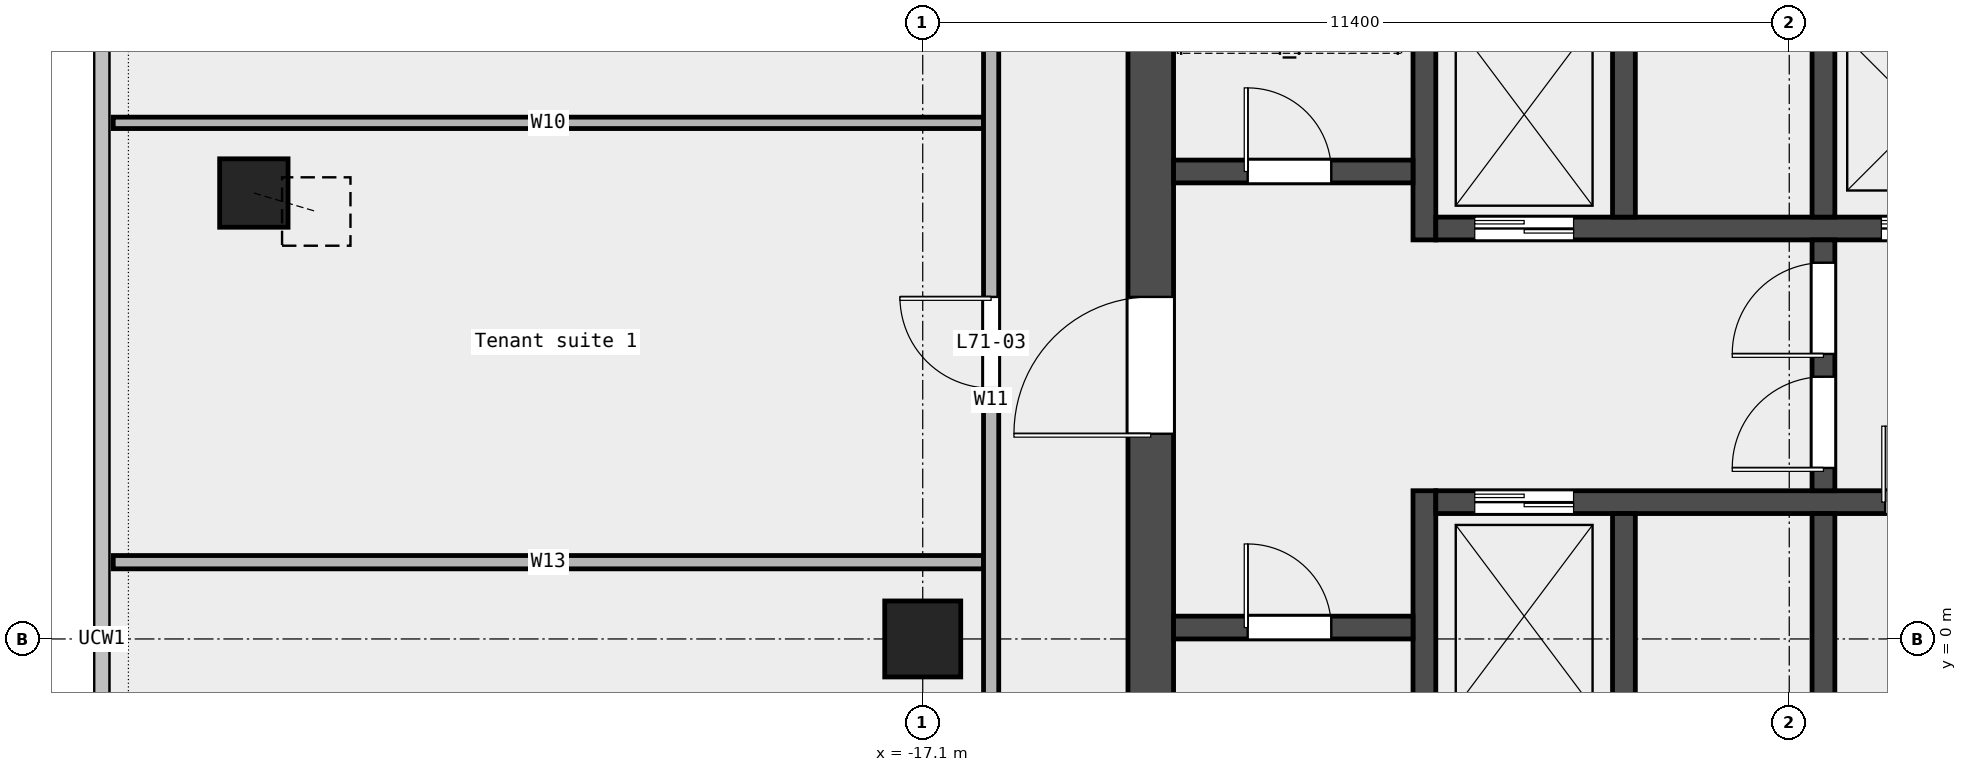
"""IFC4 building model, lengths in metres.
Left out: names, types, materials, properties, quantities, classifications, styles, units other than length and angle.
Written with IfcOpenShell. Run it as: python <this file> out.ifc"""

import sys

from ifc_helpers import new_model, si_unit, direction, frame, frame_2d, origin, origin_2d, place, context, subcontext, project, spatial, rectangle, extrude, element, fill, save


model = new_model("IFC4")
c1 = context("Model", 3, precision=1e-05, world=origin(), true_north=direction((0.0, 1.0)))
c2 = subcontext(c1, "Body", "Model", "MODEL_VIEW")
j1 = project(units=[si_unit("LENGTHUNIT", "METRE"), si_unit("PLANEANGLEUNIT", "RADIAN")], contexts=[c1])
p1 = place(None, origin())
s1 = spatial("IfcSite", under=j1, at=p1, CompositionType="ELEMENT")
p2 = place(p1, origin())
s2 = spatial("IfcBuilding", under=s1, at=p2, CompositionType="ELEMENT")
p3 = place(p2, frame((0.0, 0.0, 325.4)))
s3 = spatial("IfcBuildingStorey", under=s2, at=p3, CompositionType="ELEMENT", Elevation=325.4)
p4 = place(p3, frame((-25.9, 5.867, 0.0), z_axis=(0.218989598564, -0.064856865944, 0.973569279847), x_axis=(0.283971837833, 0.958832621117, 0.0)))
e1 = element("IfcColumn", 1, at=p4, inside=s3, PredefinedType="COLUMN", context=c2, shape_type="SweptSolid", body=[
    extrude(rectangle(XDim=0.9, YDim=0.9, at=origin_2d()), origin(), (0.0, 0.0, 1.0), 3.749),
])
p5 = place(p3, frame((-17.1, 0.0, 0.0), z_axis=(0.0, 0.0, 1.0), x_axis=(1.0, 0.0, 0.0)))
e2 = element("IfcColumn", 2, at=p5, inside=s3, PredefinedType="COLUMN", context=c2, shape_type="SweptSolid", body=[
    extrude(rectangle(XDim=1.0, YDim=1.0, at=origin_2d()), origin(), (0.0, 0.0, 1.0), 3.65),
])
p6 = place(p3, frame((-27.75, 1.01, 0.0), z_axis=(0.0, 0.0, 1.0), x_axis=(1.0, 0.0, 0.0)))
e3 = element("IfcWall", 3, at=p6, inside=s3, PredefinedType="PARTITIONING", context=c2, shape_type="SweptSolid", body=[
    extrude(rectangle(XDim=11.45, YDim=0.175, at=frame_2d((5.725, 0.0))), origin(), (0.0, 0.0, 1.0), 3.65),
])
p7 = place(p3, frame((-27.75, 6.79, 0.0), z_axis=(0.0, 0.0, 1.0), x_axis=(1.0, 0.0, 0.0)))
e4 = element("IfcWall", 4, at=p7, inside=s3, PredefinedType="PARTITIONING", context=c2, shape_type="SweptSolid", body=[
    extrude(rectangle(XDim=11.45, YDim=0.15, at=frame_2d((5.725, 0.0))), origin(), (0.0, 0.0, 1.0), 3.65),
])
p8 = place(p3, frame((-16.2, -7.1, 0.0), z_axis=(0.0, 0.0, 1.0), x_axis=(0.0, 1.0, 0.0)))
e5 = element("IfcWall", 5, at=p8, inside=s3, PredefinedType="PARTITIONING", context=c2, shape_type="SweptSolid", body=[
    extrude(rectangle(XDim=20.5, YDim=0.2, at=frame_2d((10.25, 0.0))), origin(), (0.0, 0.0, 1.0), 3.65),
])
p9 = place(p8, frame((10.4, 0.0, 0.0)))
e6 = element("IfcOpeningElement", 6, at=p9, cuts=e5, PredefinedType="OPENING", context=c2, shape_type="SweptSolid", body=[
    extrude(rectangle(XDim=1.2, YDim=2.1, at=frame_2d((0.6, 1.05))), frame((0.0, 0.112, 0.0), z_axis=(0.0, -1.0, 0.0), x_axis=(1.0, 0.0, 0.0)), (0.0, 0.0, 1.0), 0.224),
])
p10 = place(p3, frame((-14.1, -6.6, 0.0), z_axis=(0.0, 0.0, 1.0), x_axis=(0.0, 1.0, 0.0)))
e7 = element("IfcWall", 7, at=p10, inside=s3, PredefinedType="SHEAR", context=c2, shape_type="SweptSolid", body=[
    extrude(rectangle(XDim=19.5, YDim=0.6, at=frame_2d((9.75, 0.0))), origin(), (0.0, 0.0, 1.0), 3.7),
])
p11 = place(p10, frame((9.3, 0.0, 0.0)))
e8 = element("IfcOpeningElement", 8, at=p11, cuts=e7, PredefinedType="OPENING", context=c2, shape_type="SweptSolid", body=[
    extrude(rectangle(XDim=1.8, YDim=2.1, at=frame_2d((0.9, 1.05))), frame((0.0, 0.312, 0.0), z_axis=(0.0, -1.0, 0.0), x_axis=(1.0, 0.0, 0.0)), (0.0, 0.0, 1.0), 0.624),
])
p12 = place(p3, frame((-10.5, -6.6, 0.0), z_axis=(0.0, 0.0, 1.0), x_axis=(0.0, 1.0, 0.0)))
e9 = element("IfcWall", 9, at=p12, inside=s3, PredefinedType="SHEAR", context=c2, shape_type="SweptSolid", body=[
    extrude(rectangle(XDim=8.55, YDim=0.3, at=frame_2d((4.275, 0.0))), origin(), (0.0, 0.0, 1.0), 3.7),
])
p13 = place(p3, frame((-10.5, 5.25, 0.0), z_axis=(0.0, 0.0, 1.0), x_axis=(0.0, 1.0, 0.0)))
e10 = element("IfcWall", 10, at=p13, inside=s3, PredefinedType="SHEAR", context=c2, shape_type="SweptSolid", body=[
    extrude(rectangle(XDim=7.65, YDim=0.3, at=frame_2d((3.825, 0.0))), origin(), (0.0, 0.0, 1.0), 3.7),
])
p14 = place(p3, frame((-13.8, 0.15, 0.0), z_axis=(0.0, 0.0, 1.0), x_axis=(1.0, 0.0, 0.0)))
e11 = element("IfcWall", 11, at=p14, inside=s3, PredefinedType="SOLIDWALL", context=c2, shape_type="SweptSolid", body=[
    extrude(rectangle(XDim=3.15, YDim=0.3, at=frame_2d((1.575, 0.0))), origin(), (0.0, 0.0, 1.0), 3.7),
])
p15 = place(p14, frame((0.975, 0.0, 0.0)))
e12 = element("IfcOpeningElement", 12, at=p15, cuts=e11, PredefinedType="OPENING", context=c2, shape_type="SweptSolid", body=[
    extrude(rectangle(XDim=1.1, YDim=2.1, at=frame_2d((0.55, 1.05))), frame((0.0, 0.162, 0.0), z_axis=(0.0, -1.0, 0.0), x_axis=(1.0, 0.0, 0.0)), (0.0, 0.0, 1.0), 0.324),
])
p16 = place(p3, frame((-13.8, 6.15, 0.0), z_axis=(0.0, 0.0, 1.0), x_axis=(1.0, 0.0, 0.0)))
e13 = element("IfcWall", 13, at=p16, inside=s3, PredefinedType="SOLIDWALL", context=c2, shape_type="SweptSolid", body=[
    extrude(rectangle(XDim=3.15, YDim=0.3, at=frame_2d((1.575, 0.0))), origin(), (0.0, 0.0, 1.0), 3.7),
])
p17 = place(p16, frame((0.975, 0.0, 0.0)))
e14 = element("IfcOpeningElement", 14, at=p17, cuts=e13, PredefinedType="OPENING", context=c2, shape_type="SweptSolid", body=[
    extrude(rectangle(XDim=1.1, YDim=2.1, at=frame_2d((0.55, 1.05))), frame((0.0, 0.162, 0.0), z_axis=(0.0, -1.0, 0.0), x_axis=(1.0, 0.0, 0.0)), (0.0, 0.0, 1.0), 0.324),
])
p18 = place(p3, frame((-10.35, 1.8, 0.0), z_axis=(0.0, 0.0, 1.0), x_axis=(1.0, 0.0, 0.0)))
e15 = element("IfcWall", 15, at=p18, inside=s3, PredefinedType="SOLIDWALL", context=c2, shape_type="SweptSolid", body=[
    extrude(rectangle(XDim=20.7, YDim=0.3, at=frame_2d((10.35, 0.0))), origin(), (0.0, 0.0, 1.0), 3.7),
])
p19 = place(p18, frame((0.512, 0.0, 0.0)))
e16 = element("IfcOpeningElement", 16, at=p19, cuts=e15, PredefinedType="OPENING", context=c2, shape_type="SweptSolid", body=[
    extrude(rectangle(XDim=1.3, YDim=2.1, at=frame_2d((0.65, 1.05))), frame((0.0, 0.162, 0.0), z_axis=(0.0, -1.0, 0.0), x_axis=(1.0, 0.0, 0.0)), (0.0, 0.0, 1.0), 0.324),
])
p20 = place(p18, frame((5.913, 0.0, 0.0)))
e17 = element("IfcOpeningElement", 17, at=p20, cuts=e15, PredefinedType="OPENING", context=c2, shape_type="SweptSolid", body=[
    extrude(rectangle(XDim=1.0, YDim=2.1, at=frame_2d((0.5, 1.05))), frame((0.0, 0.162, 0.0), z_axis=(0.0, -1.0, 0.0), x_axis=(1.0, 0.0, 0.0)), (0.0, 0.0, 1.0), 0.324),
])
p21 = place(p18, frame((13.788, 0.0, 0.0)))
e18 = element("IfcOpeningElement", 18, at=p21, cuts=e15, PredefinedType="OPENING", context=c2, shape_type="SweptSolid", body=[
    extrude(rectangle(XDim=1.0, YDim=2.1, at=frame_2d((0.5, 1.05))), frame((0.0, 0.162, 0.0), z_axis=(0.0, -1.0, 0.0), x_axis=(1.0, 0.0, 0.0)), (0.0, 0.0, 1.0), 0.324),
])
p22 = place(p3, frame((-10.35, 5.4, 0.0), z_axis=(0.0, 0.0, 1.0), x_axis=(1.0, 0.0, 0.0)))
e19 = element("IfcWall", 19, at=p22, inside=s3, PredefinedType="SOLIDWALL", context=c2, shape_type="SweptSolid", body=[
    extrude(rectangle(XDim=20.7, YDim=0.3, at=frame_2d((10.35, 0.0))), origin(), (0.0, 0.0, 1.0), 3.7),
])
p23 = place(p22, frame((0.512, 0.0, 0.0)))
e20 = element("IfcOpeningElement", 20, at=p23, cuts=e19, PredefinedType="OPENING", context=c2, shape_type="SweptSolid", body=[
    extrude(rectangle(XDim=1.3, YDim=2.1, at=frame_2d((0.65, 1.05))), frame((0.0, 0.162, 0.0), z_axis=(0.0, -1.0, 0.0), x_axis=(1.0, 0.0, 0.0)), (0.0, 0.0, 1.0), 0.324),
])
p24 = place(p22, frame((5.863, 0.0, 0.0)))
e21 = element("IfcOpeningElement", 21, at=p24, cuts=e19, PredefinedType="OPENING", context=c2, shape_type="SweptSolid", body=[
    extrude(rectangle(XDim=1.1, YDim=2.1, at=frame_2d((0.55, 1.05))), frame((0.0, 0.162, 0.0), z_axis=(0.0, -1.0, 0.0), x_axis=(1.0, 0.0, 0.0)), (0.0, 0.0, 1.0), 0.324),
])
p25 = place(p22, frame((8.488, 0.0, 0.0)))
e22 = element("IfcOpeningElement", 22, at=p25, cuts=e19, PredefinedType="OPENING", context=c2, shape_type="SweptSolid", body=[
    extrude(rectangle(XDim=1.1, YDim=2.1, at=frame_2d((0.55, 1.05))), frame((0.0, 0.162, 0.0), z_axis=(0.0, -1.0, 0.0), x_axis=(1.0, 0.0, 0.0)), (0.0, 0.0, 1.0), 0.324),
])
p26 = place(p22, frame((11.113, 0.0, 0.0)))
e23 = element("IfcOpeningElement", 23, at=p26, cuts=e19, PredefinedType="OPENING", context=c2, shape_type="SweptSolid", body=[
    extrude(rectangle(XDim=1.1, YDim=2.1, at=frame_2d((0.55, 1.05))), frame((0.0, 0.162, 0.0), z_axis=(0.0, -1.0, 0.0), x_axis=(1.0, 0.0, 0.0)), (0.0, 0.0, 1.0), 0.324),
])
p27 = place(p22, frame((13.738, 0.0, 0.0)))
e24 = element("IfcOpeningElement", 24, at=p27, cuts=e19, PredefinedType="OPENING", context=c2, shape_type="SweptSolid", body=[
    extrude(rectangle(XDim=1.1, YDim=2.1, at=frame_2d((0.55, 1.05))), frame((0.0, 0.162, 0.0), z_axis=(0.0, -1.0, 0.0), x_axis=(1.0, 0.0, 0.0)), (0.0, 0.0, 1.0), 0.324),
])
p28 = place(p22, frame((16.363, 0.0, 0.0)))
e25 = element("IfcOpeningElement", 25, at=p28, cuts=e19, PredefinedType="OPENING", context=c2, shape_type="SweptSolid", body=[
    extrude(rectangle(XDim=1.1, YDim=2.1, at=frame_2d((0.55, 1.05))), frame((0.0, 0.162, 0.0), z_axis=(0.0, -1.0, 0.0), x_axis=(1.0, 0.0, 0.0)), (0.0, 0.0, 1.0), 0.324),
])
p29 = place(p22, frame((18.988, 0.0, 0.0)))
e26 = element("IfcOpeningElement", 26, at=p29, cuts=e19, PredefinedType="OPENING", context=c2, shape_type="SweptSolid", body=[
    extrude(rectangle(XDim=1.1, YDim=2.1, at=frame_2d((0.55, 1.05))), frame((0.0, 0.162, 0.0), z_axis=(0.0, -1.0, 0.0), x_axis=(1.0, 0.0, 0.0)), (0.0, 0.0, 1.0), 0.324),
])
for number, where, z_axis, x_axis in (
    (27, (-7.875, -1.05, 0.0), (0.0, 0.0, 1.0), (0.0, 1.0, 0.0)),
    (28, (-5.25, -1.05, 0.0), (0.0, 0.0, 1.0), (0.0, 1.0, 0.0)),
    (29, (-7.875, 5.55, 0.0), (0.0, 0.0, 1.0), (0.0, 1.0, 0.0)),
    (30, (-5.25, 5.55, 0.0), (0.0, 0.0, 1.0), (0.0, 1.0, 0.0)),
):
    element("IfcWall", number, at=place(p3, frame(where, z_axis=z_axis, x_axis=x_axis)), inside=s3, PredefinedType="SOLIDWALL", context=c2, shape_type="SweptSolid", body=[
        extrude(rectangle(XDim=2.7, YDim=0.3, at=frame_2d((1.35, 0.0))), origin(), (0.0, 0.0, 1.0), 3.7),
    ])
p30 = place(p3, frame((-5.25, 1.95, 0.0), z_axis=(0.0, 0.0, 1.0), x_axis=(0.0, 1.0, 0.0)))
e31 = element("IfcWall", 31, at=p30, inside=s3, PredefinedType="SOLIDWALL", context=c2, shape_type="SweptSolid", body=[
    extrude(rectangle(XDim=3.3, YDim=0.3, at=frame_2d((1.65, 0.0))), origin(), (0.0, 0.0, 1.0), 3.7),
])
p31 = place(p30, frame((0.3, 0.0, 0.0)))
e32 = element("IfcOpeningElement", 32, at=p31, cuts=e31, PredefinedType="OPENING", context=c2, shape_type="SweptSolid", body=[
    extrude(rectangle(XDim=1.2, YDim=2.1, at=frame_2d((0.6, 1.05))), frame((0.0, 0.162, 0.0), z_axis=(0.0, -1.0, 0.0), x_axis=(1.0, 0.0, 0.0)), (0.0, 0.0, 1.0), 0.324),
])
p32 = place(p30, frame((1.8, 0.0, 0.0)))
e33 = element("IfcOpeningElement", 33, at=p32, cuts=e31, PredefinedType="OPENING", context=c2, shape_type="SweptSolid", body=[
    extrude(rectangle(XDim=1.2, YDim=2.1, at=frame_2d((0.6, 1.05))), frame((0.0, 0.162, 0.0), z_axis=(0.0, -1.0, 0.0), x_axis=(1.0, 0.0, 0.0)), (0.0, 0.0, 1.0), 0.324),
])
p33 = place(p9, origin())
e34 = element("IfcDoor", 34, at=p33, inside=s3, OperationType="SINGLE_SWING_RIGHT", PredefinedType="DOOR", context=c2, shape_type="SweptSolid", body=[
    extrude(rectangle(XDim=1.2, YDim=2.1, at=frame_2d((0.6, 1.05))), frame((0.0, 0.025, 0.0), z_axis=(0.0, -1.0, 0.0), x_axis=(1.0, 0.0, 0.0)), (0.0, 0.0, 1.0), 0.05),
])
fill(e6, e34)
p34 = place(p15, origin())
e35 = element("IfcDoor", 35, at=p34, inside=s3, OperationType="SINGLE_SWING_LEFT", PredefinedType="DOOR", context=c2, shape_type="SweptSolid", body=[
    extrude(rectangle(XDim=1.1, YDim=2.1, at=frame_2d((0.55, 1.05))), frame((0.0, 0.025, 0.0), z_axis=(0.0, -1.0, 0.0), x_axis=(1.0, 0.0, 0.0)), (0.0, 0.0, 1.0), 0.05),
])
fill(e12, e35)
p35 = place(p17, origin())
e36 = element("IfcDoor", 36, at=p35, inside=s3, OperationType="SINGLE_SWING_LEFT", PredefinedType="DOOR", context=c2, shape_type="SweptSolid", body=[
    extrude(rectangle(XDim=1.1, YDim=2.1, at=frame_2d((0.55, 1.05))), frame((0.0, 0.025, 0.0), z_axis=(0.0, -1.0, 0.0), x_axis=(1.0, 0.0, 0.0)), (0.0, 0.0, 1.0), 0.05),
])
fill(e14, e36)
p36 = place(p11, origin())
e37 = element("IfcDoor", 37, at=p36, inside=s3, OperationType="DOUBLE_DOOR_SINGLE_SWING", PredefinedType="DOOR", context=c2, shape_type="SweptSolid", body=[
    extrude(rectangle(XDim=1.8, YDim=2.1, at=frame_2d((0.9, 1.05))), frame((0.0, 0.025, 0.0), z_axis=(0.0, -1.0, 0.0), x_axis=(1.0, 0.0, 0.0)), (0.0, 0.0, 1.0), 0.05),
])
fill(e8, e37)
p37 = place(p31, origin())
e38 = element("IfcDoor", 38, at=p37, inside=s3, OperationType="SINGLE_SWING_LEFT", PredefinedType="DOOR", context=c2, shape_type="SweptSolid", body=[
    extrude(rectangle(XDim=1.2, YDim=2.1, at=frame_2d((0.6, 1.05))), frame((0.0, 0.025, 0.0), z_axis=(0.0, -1.0, 0.0), x_axis=(1.0, 0.0, 0.0)), (0.0, 0.0, 1.0), 0.05),
])
fill(e32, e38)
p38 = place(p32, origin())
e39 = element("IfcDoor", 39, at=p38, inside=s3, OperationType="SINGLE_SWING_RIGHT", PredefinedType="DOOR", context=c2, shape_type="SweptSolid", body=[
    extrude(rectangle(XDim=1.2, YDim=2.1, at=frame_2d((0.6, 1.05))), frame((0.0, 0.025, 0.0), z_axis=(0.0, -1.0, 0.0), x_axis=(1.0, 0.0, 0.0)), (0.0, 0.0, 1.0), 0.05),
])
fill(e33, e39)
p39 = place(p19, origin())
e40 = element("IfcDoor", 40, at=p39, inside=s3, OperationType="DOUBLE_DOOR_SLIDING", PredefinedType="DOOR", context=c2, shape_type="SweptSolid", body=[
    extrude(rectangle(XDim=1.3, YDim=2.1, at=frame_2d((0.65, 1.05))), frame((0.0, 0.025, 0.0), z_axis=(0.0, -1.0, 0.0), x_axis=(1.0, 0.0, 0.0)), (0.0, 0.0, 1.0), 0.05),
])
fill(e16, e40)
p40 = place(p23, origin())
e41 = element("IfcDoor", 41, at=p40, inside=s3, OperationType="DOUBLE_DOOR_SLIDING", PredefinedType="DOOR", context=c2, shape_type="SweptSolid", body=[
    extrude(rectangle(XDim=1.3, YDim=2.1, at=frame_2d((0.65, 1.05))), frame((0.0, 0.025, 0.0), z_axis=(0.0, -1.0, 0.0), x_axis=(1.0, 0.0, 0.0)), (0.0, 0.0, 1.0), 0.05),
])
fill(e20, e41)
p41 = place(p24, origin())
e42 = element("IfcDoor", 42, at=p41, inside=s3, OperationType="DOUBLE_DOOR_SLIDING", PredefinedType="DOOR", context=c2, shape_type="SweptSolid", body=[
    extrude(rectangle(XDim=1.1, YDim=2.1, at=frame_2d((0.55, 1.05))), frame((0.0, 0.025, 0.0), z_axis=(0.0, -1.0, 0.0), x_axis=(1.0, 0.0, 0.0)), (0.0, 0.0, 1.0), 0.05),
])
fill(e21, e42)
p42 = place(p20, origin())
e43 = element("IfcDoor", 43, at=p42, inside=s3, OperationType="SINGLE_SWING_LEFT", PredefinedType="DOOR", context=c2, shape_type="SweptSolid", body=[
    extrude(rectangle(XDim=1.0, YDim=2.1, at=frame_2d((0.5, 1.05))), frame((0.0, 0.025, 0.0), z_axis=(0.0, -1.0, 0.0), x_axis=(1.0, 0.0, 0.0)), (0.0, 0.0, 1.0), 0.05),
])
fill(e17, e43)
save(model, sys.argv[1])
